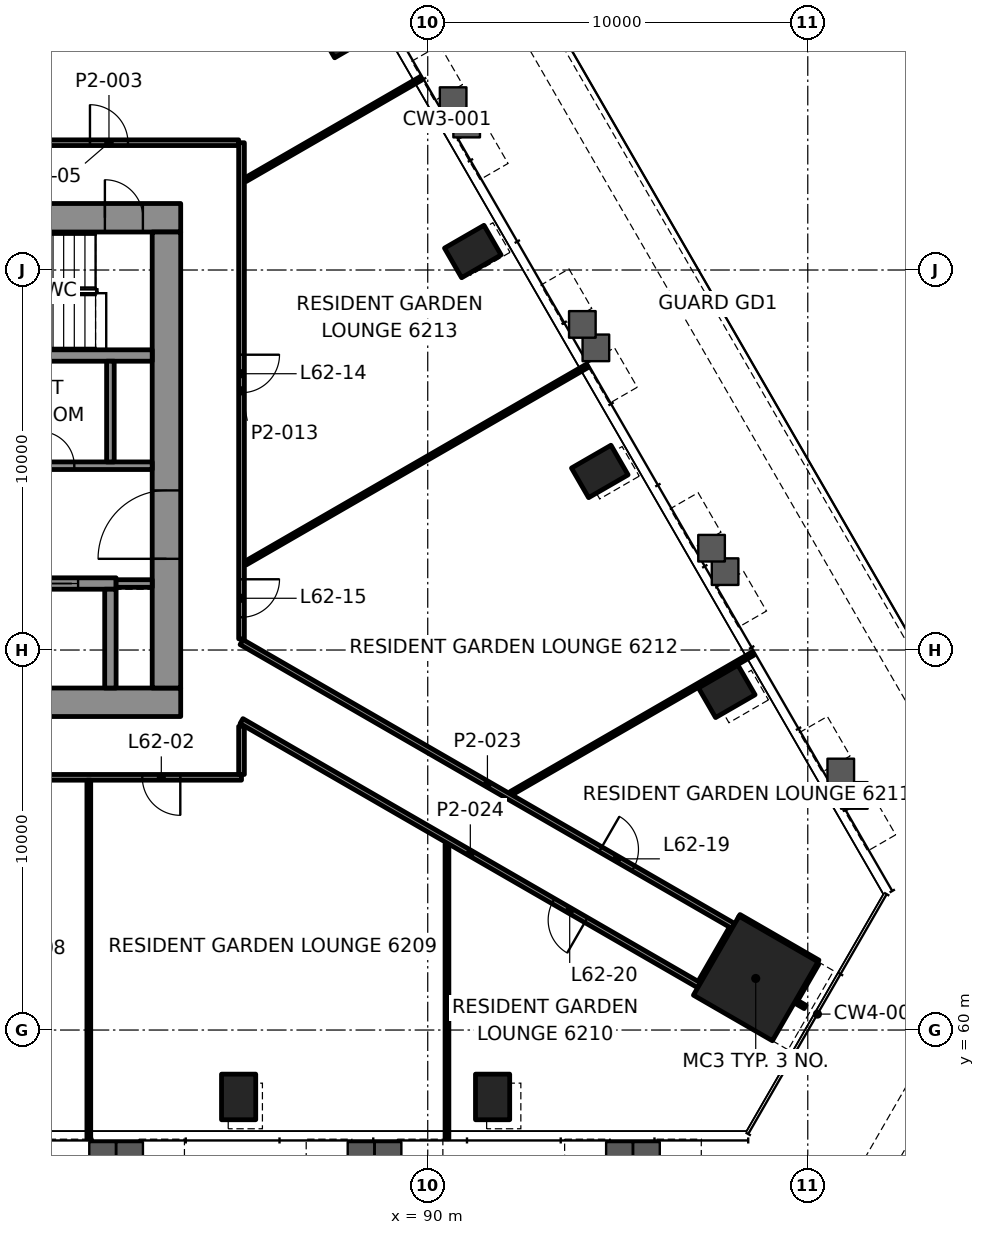
"""IFC4 building model, lengths in metres.
Left out: names, types, materials, properties, quantities, classifications, styles, units other than length and angle.
Written with IfcOpenShell. Run it as: python <this file> out.ifc"""

import sys

from ifc_helpers import new_model, si_unit, direction, frame, frame_2d, origin, origin_2d, place, context, subcontext, project, spatial, rectangle, hollow_rectangle, extrude, element, fill, save


model = new_model("IFC4")
c1 = context("Model", 3, precision=1e-05, world=origin(), true_north=direction((0.0, 1.0)))
c2 = subcontext(c1, "Body", "Model", "MODEL_VIEW")
j1 = project(units=[si_unit("LENGTHUNIT", "METRE"), si_unit("PLANEANGLEUNIT", "RADIAN")], contexts=[c1])
p1 = place(None, origin())
s1 = spatial("IfcSite", under=j1, at=p1, CompositionType="ELEMENT")
p2 = place(p1, origin())
s2 = spatial("IfcBuilding", under=s1, at=p2, CompositionType="ELEMENT")
p3 = place(p2, frame((0.0, 0.0, 263.6)))
s3 = spatial("IfcBuildingStorey", under=s2, at=p3, CompositionType="ELEMENT", Elevation=263.6)
p4 = place(p3, frame((98.63, 61.357, 0.0), z_axis=(0.0, 0.0, 1.0), x_axis=(0.5, 0.866025403784, 0.0)))
e1 = element("IfcColumn", 1, at=p4, inside=s3, PredefinedType="COLUMN", context=c2, shape_type="SweptSolid", body=[
    extrude(rectangle(XDim=2.4, YDim=2.4, at=origin_2d()), origin(), (0.0, 0.0, 1.0), 3.5),
])
for number, where, z_axis, x_axis in (
    (2, (85.024, 58.239, -0.0), (0.0, 0.0, 1.0), (1.0, 0.0, 0.0)),
    (3, (91.707, 58.239, -0.0), (0.0, 0.0, 1.0), (1.0, 0.0, 0.0)),
    (4, (97.869, 68.912, -0.0), (0.0, 0.0, 1.0), (-0.5, 0.866, 0.0)),
    (5, (94.527, 74.699, -0.0), (0.0, 0.0, 1.0), (-0.5, 0.866, 0.0)),
    (6, (91.186, 80.487, -0.0), (0.0, 0.0, 1.0), (-0.5, 0.866, 0.0)),
    (7, (87.844, 86.274, -0.0), (0.0, 0.0, 1.0), (-0.5, 0.866, 0.0)),
):
    element("IfcColumn", number, at=place(p3, frame(where, z_axis=z_axis, x_axis=x_axis)), inside=s3, PredefinedType="COLUMN", context=c2, shape_type="SweptSolid", body=[
        extrude(hollow_rectangle(XDim=0.9, YDim=1.2, WallThickness=0.06, at=origin_2d()), origin(), (0.0, 0.0, 1.0), 3.5),
    ])
p5 = place(p3, frame((66.5, 68.625, 0.0), z_axis=(0.0, 0.0, 1.0), x_axis=(1.0, 0.0, 0.0)))
e8 = element("IfcWall", 8, at=p5, inside=s3, PredefinedType="SHEAR", context=c2, shape_type="SweptSolid", body=[
    extrude(rectangle(XDim=17.0, YDim=0.75, at=frame_2d((8.5, 0.0))), origin(), (0.0, 0.0, 1.0), 3.3),
])
p6 = place(p5, frame((2.7, 0.0, 0.0)))
e9 = element("IfcOpeningElement", 9, at=p6, cuts=e8, PredefinedType="OPENING", context=c2, shape_type="SweptSolid", body=[
    extrude(rectangle(XDim=0.9, YDim=2.1, at=frame_2d((0.45, 1.05))), frame((0.0, 0.385, 0.0), z_axis=(0.0, -1.0, 0.0), x_axis=(1.0, 0.0, 0.0)), (0.0, 0.0, 1.0), 0.77),
])
p7 = place(p3, frame((66.5, 81.375, 0.0), z_axis=(0.0, 0.0, 1.0), x_axis=(1.0, 0.0, 0.0)))
e10 = element("IfcWall", 10, at=p7, inside=s3, PredefinedType="SHEAR", context=c2, shape_type="SweptSolid", body=[
    extrude(rectangle(XDim=17.0, YDim=0.75, at=frame_2d((8.5, 0.0))), origin(), (0.0, 0.0, 1.0), 3.3),
])
p8 = place(p7, frame((1.195, 0.0, 0.0)))
e11 = element("IfcOpeningElement", 11, at=p8, cuts=e10, PredefinedType="OPENING", context=c2, shape_type="SweptSolid", body=[
    extrude(rectangle(XDim=1.0, YDim=2.1, at=frame_2d((0.5, 1.05))), frame((0.0, 0.385, 0.0), z_axis=(0.0, -1.0, 0.0), x_axis=(1.0, 0.0, 0.0)), (0.0, 0.0, 1.0), 0.77),
])
p9 = place(p7, frame((15.005, 0.0, 0.0)))
e12 = element("IfcOpeningElement", 12, at=p9, cuts=e10, PredefinedType="OPENING", context=c2, shape_type="SweptSolid", body=[
    extrude(rectangle(XDim=1.0, YDim=2.1, at=frame_2d((0.5, 1.05))), frame((0.0, 0.385, 0.0), z_axis=(0.0, -1.0, 0.0), x_axis=(1.0, 0.0, 0.0)), (0.0, 0.0, 1.0), 0.77),
])
p10 = place(p7, frame((8.15, 0.0, 0.0)))
e13 = element("IfcOpeningElement", 13, at=p10, cuts=e10, PredefinedType="OPENING", context=c2, shape_type="SweptSolid", body=[
    extrude(rectangle(XDim=0.9, YDim=2.1, at=frame_2d((0.45, 1.05))), frame((0.0, 0.385, 0.0), z_axis=(0.0, -1.0, 0.0), x_axis=(1.0, 0.0, 0.0)), (0.0, 0.0, 1.0), 0.77),
])
p11 = place(p3, frame((83.125, 69.0, 0.0), z_axis=(0.0, 0.0, 1.0), x_axis=(0.0, 1.0, 0.0)))
e14 = element("IfcWall", 14, at=p11, inside=s3, PredefinedType="SHEAR", context=c2, shape_type="SweptSolid", body=[
    extrude(rectangle(XDim=12.0, YDim=0.75, at=frame_2d((6.0, 0.0))), origin(), (0.0, 0.0, 1.0), 3.3),
])
p12 = place(p11, frame((3.4, 0.0, 0.0)))
e15 = element("IfcOpeningElement", 15, at=p12, cuts=e14, PredefinedType="OPENING", context=c2, shape_type="SweptSolid", body=[
    extrude(rectangle(XDim=1.8, YDim=2.1, at=frame_2d((0.9, 1.05))), frame((0.0, 0.385, 0.0), z_axis=(0.0, -1.0, 0.0), x_axis=(1.0, 0.0, 0.0)), (0.0, 0.0, 1.0), 0.77),
])
p13 = place(p3, frame((70.3, 71.75, 0.0), z_axis=(0.0, 0.0, 1.0), x_axis=(1.0, 0.0, 0.0)))
e16 = element("IfcWall", 16, at=p13, inside=s3, PredefinedType="SHEAR", context=c2, shape_type="SweptSolid", body=[
    extrude(rectangle(XDim=11.5, YDim=0.3, at=frame_2d((5.75, 0.0))), origin(), (0.0, 0.0, 1.0), 3.3),
])
p14 = place(p13, frame((1.0, 0.0, 0.0)))
e17 = element("IfcOpeningElement", 17, at=p14, cuts=e16, PredefinedType="OPENING", context=c2, shape_type="SweptSolid", body=[
    extrude(rectangle(XDim=1.1, YDim=2.1, at=frame_2d((0.55, 1.05))), frame((0.0, 0.16, 0.0), z_axis=(0.0, -1.0, 0.0), x_axis=(1.0, 0.0, 0.0)), (0.0, 0.0, 1.0), 0.32),
])
p15 = place(p13, frame((3.8, 0.0, 0.0)))
e18 = element("IfcOpeningElement", 18, at=p15, cuts=e16, PredefinedType="OPENING", context=c2, shape_type="SweptSolid", body=[
    extrude(rectangle(XDim=1.1, YDim=2.1, at=frame_2d((0.55, 1.05))), frame((0.0, 0.16, 0.0), z_axis=(0.0, -1.0, 0.0), x_axis=(1.0, 0.0, 0.0)), (0.0, 0.0, 1.0), 0.32),
])
p16 = place(p13, frame((6.6, 0.0, 0.0)))
e19 = element("IfcOpeningElement", 19, at=p16, cuts=e16, PredefinedType="OPENING", context=c2, shape_type="SweptSolid", body=[
    extrude(rectangle(XDim=1.1, YDim=2.1, at=frame_2d((0.55, 1.05))), frame((0.0, 0.16, 0.0), z_axis=(0.0, -1.0, 0.0), x_axis=(1.0, 0.0, 0.0)), (0.0, 0.0, 1.0), 0.32),
])
p17 = place(p13, frame((9.4, 0.0, 0.0)))
e20 = element("IfcOpeningElement", 20, at=p17, cuts=e16, PredefinedType="OPENING", context=c2, shape_type="SweptSolid", body=[
    extrude(rectangle(XDim=1.1, YDim=2.1, at=frame_2d((0.55, 1.05))), frame((0.0, 0.16, 0.0), z_axis=(0.0, -1.0, 0.0), x_axis=(1.0, 0.0, 0.0)), (0.0, 0.0, 1.0), 0.32),
])
p18 = place(p3, frame((81.65, 69.0, 0.0), z_axis=(0.0, 0.0, 1.0), x_axis=(0.0, 1.0, 0.0)))
e21 = element("IfcWall", 21, at=p18, inside=s3, PredefinedType="SHEAR", context=c2, shape_type="SweptSolid", body=[
    extrude(rectangle(XDim=2.6, YDim=0.3, at=frame_2d((1.3, 0.0))), origin(), (0.0, 0.0, 1.0), 3.3),
])
p19 = place(p3, frame((67.25, 77.75, 0.0), z_axis=(0.0, 0.0, 1.0), x_axis=(1.0, 0.0, 0.0)))
e22 = element("IfcWall", 22, at=p19, inside=s3, PredefinedType="SHEAR", context=c2, shape_type="SweptSolid", body=[
    extrude(rectangle(XDim=15.5, YDim=0.3, at=frame_2d((7.75, 0.0))), origin(), (0.0, 0.0, 1.0), 3.3),
])
p20 = place(p19, frame((0.445, 0.0, 0.0)))
e23 = element("IfcOpeningElement", 23, at=p20, cuts=e22, PredefinedType="OPENING", context=c2, shape_type="SweptSolid", body=[
    extrude(rectangle(XDim=1.0, YDim=2.1, at=frame_2d((0.5, 1.05))), frame((0.0, 0.16, 0.0), z_axis=(0.0, -1.0, 0.0), x_axis=(1.0, 0.0, 0.0)), (0.0, 0.0, 1.0), 0.32),
])
p21 = place(p3, frame((85.1, 66.65, 0.0), z_axis=(0.0, 0.0, 1.0), x_axis=(-1.0, 0.0, 0.0)))
e24 = element("IfcWall", 24, at=p21, inside=s3, PredefinedType="PARTITIONING", context=c2, shape_type="SweptSolid", body=[
    extrude(rectangle(XDim=20.2, YDim=0.15, at=frame_2d((10.1, 0.0))), origin(), (0.0, 0.0, 1.0), 2.7),
])
p22 = place(p21, frame((1.61, 0.0, 0.0)))
e25 = element("IfcOpeningElement", 25, at=p22, cuts=e24, PredefinedType="OPENING", context=c2, shape_type="SweptSolid", body=[
    extrude(rectangle(XDim=1.0, YDim=2.1, at=frame_2d((0.5, 1.05))), frame((0.0, 0.085, 0.0), z_axis=(0.0, -1.0, 0.0), x_axis=(1.0, 0.0, 0.0)), (0.0, 0.0, 1.0), 0.17),
])
p23 = place(p21, frame((8.229, 0.0, 0.0)))
e26 = element("IfcOpeningElement", 26, at=p23, cuts=e24, PredefinedType="OPENING", context=c2, shape_type="SweptSolid", body=[
    extrude(rectangle(XDim=1.0, YDim=2.1, at=frame_2d((0.5, 1.05))), frame((0.0, 0.085, 0.0), z_axis=(0.0, -1.0, 0.0), x_axis=(1.0, 0.0, 0.0)), (0.0, 0.0, 1.0), 0.17),
])
p24 = place(p3, frame((78.2, 83.35, 0.0), z_axis=(0.0, 0.0, 1.0), x_axis=(1.0, 0.0, 0.0)))
e27 = element("IfcWall", 27, at=p24, inside=s3, PredefinedType="PARTITIONING", context=c2, shape_type="SweptSolid", body=[
    extrude(rectangle(XDim=6.824, YDim=0.15, at=frame_2d((3.412, 0.0))), origin(), (0.0, 0.0, 1.0), 2.7),
])
p25 = place(p24, frame((2.912, 0.0, 0.0)))
e28 = element("IfcOpeningElement", 28, at=p25, cuts=e27, PredefinedType="OPENING", context=c2, shape_type="SweptSolid", body=[
    extrude(rectangle(XDim=1.0, YDim=2.1, at=frame_2d((0.5, 1.05))), frame((0.0, 0.085, 0.0), z_axis=(0.0, -1.0, 0.0), x_axis=(1.0, 0.0, 0.0)), (0.0, 0.0, 1.0), 0.17),
])
p26 = place(p3, frame((92.192, 66.23, 0.0), z_axis=(0.0, 0.0, 1.0), x_axis=(0.866026984066, 0.499997262862, 0.0)))
e29 = element("IfcWall", 29, at=p26, inside=s3, PredefinedType="PARTITIONING", context=c2, shape_type="SweptSolid", body=[
    extrude(rectangle(XDim=7.357, YDim=0.1, at=frame_2d((3.678, 0.0))), origin(), (0.0, 0.0, 1.0), 2.688),
])
p27 = place(p3, frame((85.201, 72.284, 0.0), z_axis=(0.0, 0.0, 1.0), x_axis=(0.866018018137, 0.500012792098, 0.0)))
e30 = element("IfcWall", 30, at=p27, inside=s3, PredefinedType="PARTITIONING", context=c2, shape_type="SweptSolid", body=[
    extrude(rectangle(XDim=10.385, YDim=0.1, at=frame_2d((5.192, 0.0))), origin(), (0.0, 0.0, 1.0), 2.688),
])
p28 = place(p3, frame((85.201, 82.375, 0.0), z_axis=(0.0, 0.0, 1.0), x_axis=(0.866025682925, 0.499999516514, 0.0)))
e31 = element("IfcWall", 31, at=p28, inside=s3, PredefinedType="PARTITIONING", context=c2, shape_type="SweptSolid", body=[
    extrude(rectangle(XDim=5.339, YDim=0.1, at=frame_2d((2.67, 0.0))), origin(), (0.0, 0.0, 1.0), 2.688),
])
p29 = place(p3, frame((99.67, 60.757, 0.0), z_axis=(0.0, 0.0, 1.0), x_axis=(0.500022773673, 0.866012254999, 0.0)))
e32 = element("IfcWall", 32, at=p29, inside=s3, PredefinedType="PARTITIONING", context=c2, shape_type="SweptSolid", body=[
    extrude(rectangle(XDim=1.149, YDim=0.1, at=frame_2d((0.575, 0.0))), origin(), (0.0, 0.0, 1.0), 2.7),
])
p30 = place(p3, frame((97.179, 61.243, 0.0), z_axis=(0.0, 0.0, 1.0), x_axis=(0.499988108725, 0.866032269107, 0.0)))
e33 = element("IfcWall", 33, at=p30, inside=s3, PredefinedType="PARTITIONING", context=c2, shape_type="SweptSolid", body=[
    extrude(rectangle(XDim=1.644, YDim=0.15, at=frame_2d((0.822, 0.0))), origin(), (0.0, 0.0, 1.0), 2.547),
])
p31 = place(p3, frame((90.506, 57.139, 0.0), z_axis=(0.0, 0.0, 1.0), x_axis=(0.0, 1.0, 0.0)))
e34 = element("IfcWall", 34, at=p31, inside=s3, PredefinedType="PARTITIONING", context=c2, shape_type="SweptSolid", body=[
    extrude(rectangle(XDim=7.753, YDim=0.1, at=frame_2d((3.876, 0.0))), origin(), (0.0, 0.0, 1.0), 2.7),
])
p32 = place(p3, frame((85.1, 66.726, 0.0), z_axis=(0.0, 0.0, 1.0), x_axis=(0.0, 1.0, 0.0)))
e35 = element("IfcWall", 35, at=p32, inside=s3, PredefinedType="PARTITIONING", context=c2, shape_type="SweptSolid", body=[
    extrude(rectangle(XDim=1.267, YDim=0.15, at=frame_2d((0.634, 0.0))), origin(), (0.0, 0.0, 1.0), 2.547),
])
p33 = place(p3, frame((85.1, 83.35, 0.0), z_axis=(0.0, 0.0, 1.0), x_axis=(0.0, -1.0, 0.0)))
e36 = element("IfcWall", 36, at=p33, inside=s3, PredefinedType="PARTITIONING", context=c2, shape_type="SweptSolid", body=[
    extrude(rectangle(XDim=13.055, YDim=0.15, at=frame_2d((6.527, 0.0))), origin(), (0.0, 0.0, 1.0), 2.7),
])
p34 = place(p33, frame((5.579, 0.0, 0.0)))
e37 = element("IfcOpeningElement", 37, at=p34, cuts=e36, PredefinedType="OPENING", context=c2, shape_type="SweptSolid", body=[
    extrude(rectangle(XDim=1.0, YDim=2.1, at=frame_2d((0.5, 1.05))), frame((0.0, 0.085, 0.0), z_axis=(0.0, -1.0, 0.0), x_axis=(1.0, 0.0, 0.0)), (0.0, 0.0, 1.0), 0.17),
])
p35 = place(p33, frame((11.488, 0.0, 0.0)))
e38 = element("IfcOpeningElement", 38, at=p35, cuts=e36, PredefinedType="OPENING", context=c2, shape_type="SweptSolid", body=[
    extrude(rectangle(XDim=1.0, YDim=2.1, at=frame_2d((0.5, 1.05))), frame((0.0, 0.085, 0.0), z_axis=(0.0, -1.0, 0.0), x_axis=(1.0, 0.0, 0.0)), (0.0, 0.0, 1.0), 0.17),
])
p36 = place(p3, frame((81.082, 57.139, 0.0), z_axis=(0.0, 0.0, 1.0), x_axis=(0.0, 1.0, 0.0)))
e39 = element("IfcWall", 39, at=p36, inside=s3, PredefinedType="PARTITIONING", context=c2, shape_type="SweptSolid", body=[
    extrude(rectangle(XDim=9.436, YDim=0.1, at=frame_2d((4.718, 0.0))), origin(), (0.0, 0.0, 1.0), 2.688),
])
p37 = place(p3, frame((100.269, 61.796, 0.0), z_axis=(0.0, 0.0, 1.0), x_axis=(-0.865992388649, 0.500057179532, 0.0)))
e40 = element("IfcWall", 40, at=p37, inside=s3, PredefinedType="PARTITIONING", context=c2, shape_type="SweptSolid", body=[
    extrude(rectangle(XDim=2.399, YDim=0.1, at=frame_2d((1.2, 0.0))), origin(), (0.0, 0.0, 1.0), 2.7),
])
p38 = place(p3, frame((85.1, 70.208, 0.0), z_axis=(0.0, 0.0, 1.0), x_axis=(0.866022614424, -0.500004831283, 0.0)))
e41 = element("IfcWall", 41, at=p38, inside=s3, PredefinedType="PARTITIONING", context=c2, shape_type="SweptSolid", body=[
    extrude(rectangle(XDim=14.943, YDim=0.15, at=frame_2d((7.472, 0.0))), origin(), (0.0, 0.0, 1.0), 2.7),
])
p39 = place(p38, frame((10.906, 0.0, 0.0)))
e42 = element("IfcOpeningElement", 42, at=p39, cuts=e41, PredefinedType="OPENING", context=c2, shape_type="SweptSolid", body=[
    extrude(rectangle(XDim=1.0, YDim=2.1, at=frame_2d((0.5, 1.05))), frame((0.0, 0.085, 0.0), z_axis=(0.0, -1.0, 0.0), x_axis=(1.0, 0.0, 0.0)), (0.0, 0.0, 1.0), 0.17),
])
p40 = place(p3, frame((99.929, 60.607, 0.0), z_axis=(0.0, 0.0, 1.0), x_axis=(-0.865827443207, 0.500342721131, 0.0)))
e43 = element("IfcWall", 43, at=p40, inside=s3, PredefinedType="PARTITIONING", context=c2, shape_type="SweptSolid", body=[
    extrude(rectangle(XDim=0.25, YDim=0.1, at=frame_2d((0.125, 0.0))), origin(), (0.0, 0.0, 1.0), 2.7),
])
p41 = place(p3, frame((97.141, 61.178, 0.0), z_axis=(0.0, 0.0, 1.0), x_axis=(-0.866020369651, 0.500008719273, 0.0)))
e44 = element("IfcWall", 44, at=p41, inside=s3, PredefinedType="PARTITIONING", context=c2, shape_type="SweptSolid", body=[
    extrude(rectangle(XDim=13.904, YDim=0.15, at=frame_2d((6.952, 0.0))), origin(), (0.0, 0.0, 1.0), 2.547),
])
p42 = place(p41, frame((3.432, 0.0, 0.0)))
e45 = element("IfcOpeningElement", 45, at=p42, cuts=e44, PredefinedType="OPENING", context=c2, shape_type="SweptSolid", body=[
    extrude(rectangle(XDim=1.0, YDim=2.1, at=frame_2d((0.5, 1.05))), frame((0.0, 0.085, 0.0), z_axis=(0.0, -1.0, 0.0), x_axis=(1.0, 0.0, 0.0)), (0.0, 0.0, 1.0), 0.17),
])
p43 = place(p3, frame((100.672, 54.394, 0.0), z_axis=(0.0, 0.0, 1.0), x_axis=(0.499999477917, 0.866025705209, 0.0)))
e46 = element("IfcWall", 46, at=p43, inside=s3, PredefinedType="SOLIDWALL", context=c2, shape_type="SweptSolid", body=[
    extrude(rectangle(XDim=10.019, YDim=0.8, at=frame_2d((5.01, 0.0))), origin(), (0.0, 0.0, 1.0), 0.9),
])
p44 = place(p3, frame((105.682, 64.079, 0.0), z_axis=(0.0, 0.0, 1.0), x_axis=(-0.499999726341, 0.866025561782, 0.0)))
e47 = element("IfcWall", 47, at=p44, inside=s3, PredefinedType="SOLIDWALL", context=c2, shape_type="SweptSolid", body=[
    extrude(rectangle(XDim=34.095, YDim=0.8, at=frame_2d((17.048, 0.0))), origin(), (0.0, 0.0, 1.0), 0.9),
])
p45 = place(p3, frame((81.8, 71.75, 0.0), z_axis=(0.0, 0.0, 1.0), x_axis=(1.0, 0.0, 0.0)))
e48 = element("IfcWall", 48, at=p45, inside=s3, PredefinedType="PARTITIONING", context=c2, shape_type="SweptSolid", body=[
    extrude(rectangle(XDim=0.95, YDim=0.2, at=frame_2d((0.475, 0.0))), origin(), (0.0, 0.0, 1.0), 3.3),
])
p46 = place(p3, frame((76.2, 74.85, 0.0), z_axis=(0.0, 0.0, 1.0), x_axis=(1.0, 0.0, 0.0)))
e49 = element("IfcWall", 49, at=p46, inside=s3, PredefinedType="PARTITIONING", context=c2, shape_type="SweptSolid", body=[
    extrude(rectangle(XDim=6.55, YDim=0.2, at=frame_2d((3.275, 0.0))), origin(), (0.0, 0.0, 1.0), 3.3),
])
p47 = place(p46, frame((0.8, 0.0, 0.0)))
e50 = element("IfcOpeningElement", 50, at=p47, cuts=e49, PredefinedType="OPENING", context=c2, shape_type="SweptSolid", body=[
    extrude(rectangle(XDim=0.9, YDim=2.1, at=frame_2d((0.45, 1.05))), frame((0.0, 0.11, 0.0), z_axis=(0.0, -1.0, 0.0), x_axis=(1.0, 0.0, 0.0)), (0.0, 0.0, 1.0), 0.22),
])
p48 = place(p46, frame((3.6, 0.0, 0.0)))
e51 = element("IfcOpeningElement", 51, at=p48, cuts=e49, PredefinedType="OPENING", context=c2, shape_type="SweptSolid", body=[
    extrude(rectangle(XDim=0.9, YDim=2.1, at=frame_2d((0.45, 1.05))), frame((0.0, 0.11, 0.0), z_axis=(0.0, -1.0, 0.0), x_axis=(1.0, 0.0, 0.0)), (0.0, 0.0, 1.0), 0.22),
])
p49 = place(p3, frame((81.65, 74.95, 0.0), z_axis=(0.0, 0.0, 1.0), x_axis=(0.0, 1.0, 0.0)))
e52 = element("IfcWall", 52, at=p49, inside=s3, PredefinedType="PARTITIONING", context=c2, shape_type="SweptSolid", body=[
    extrude(rectangle(XDim=2.65, YDim=0.2, at=frame_2d((1.325, 0.0))), origin(), (0.0, 0.0, 1.0), 3.3),
])
p50 = place(p22, origin())
e53 = element("IfcDoor", 53, at=p50, inside=s3, OperationType="SINGLE_SWING_LEFT", PredefinedType="DOOR", context=c2, shape_type="SweptSolid", body=[
    extrude(rectangle(XDim=1.0, YDim=2.1, at=frame_2d((0.5, 1.05))), frame((0.0, 0.025, 0.0), z_axis=(0.0, -1.0, 0.0), x_axis=(1.0, 0.0, 0.0)), (0.0, 0.0, 1.0), 0.05),
])
fill(e25, e53)
p51 = place(p25, origin())
e54 = element("IfcDoor", 54, at=p51, inside=s3, OperationType="SINGLE_SWING_LEFT", PredefinedType="DOOR", context=c2, shape_type="SweptSolid", body=[
    extrude(rectangle(XDim=1.0, YDim=2.1, at=frame_2d((0.5, 1.05))), frame((0.0, 0.025, 0.0), z_axis=(0.0, -1.0, 0.0), x_axis=(1.0, 0.0, 0.0)), (0.0, 0.0, 1.0), 0.05),
])
fill(e28, e54)
p52 = place(p34, origin())
e55 = element("IfcDoor", 55, at=p52, inside=s3, OperationType="SINGLE_SWING_LEFT", PredefinedType="DOOR", context=c2, shape_type="SweptSolid", body=[
    extrude(rectangle(XDim=1.0, YDim=2.1, at=frame_2d((0.5, 1.05))), frame((0.0, 0.025, 0.0), z_axis=(0.0, -1.0, 0.0), x_axis=(1.0, 0.0, 0.0)), (0.0, 0.0, 1.0), 0.05),
])
fill(e37, e55)
p53 = place(p35, origin())
e56 = element("IfcDoor", 56, at=p53, inside=s3, OperationType="SINGLE_SWING_RIGHT", PredefinedType="DOOR", context=c2, shape_type="SweptSolid", body=[
    extrude(rectangle(XDim=1.0, YDim=2.1, at=frame_2d((0.5, 1.05))), frame((0.0, 0.025, 0.0), z_axis=(0.0, -1.0, 0.0), x_axis=(1.0, 0.0, 0.0)), (0.0, 0.0, 1.0), 0.05),
])
fill(e38, e56)
p54 = place(p39, origin())
e57 = element("IfcDoor", 57, at=p54, inside=s3, OperationType="SINGLE_SWING_LEFT", PredefinedType="DOOR", context=c2, shape_type="SweptSolid", body=[
    extrude(rectangle(XDim=1.0, YDim=2.1, at=frame_2d((0.5, 1.05))), frame((0.0, 0.025, 0.0), z_axis=(0.0, -1.0, 0.0), x_axis=(1.0, 0.0, 0.0)), (0.0, 0.0, 1.0), 0.05),
])
fill(e42, e57)
p55 = place(p42, origin())
e58 = element("IfcDoor", 58, at=p55, inside=s3, OperationType="SINGLE_SWING_LEFT", PredefinedType="DOOR", context=c2, shape_type="SweptSolid", body=[
    extrude(rectangle(XDim=1.0, YDim=2.1, at=frame_2d((0.5, 1.05))), frame((0.0, 0.025, 0.0), z_axis=(0.0, -1.0, 0.0), x_axis=(1.0, 0.0, 0.0)), (0.0, 0.0, 1.0), 0.05),
])
fill(e45, e58)
p56 = place(p17, origin())
e59 = element("IfcDoor", 59, at=p56, inside=s3, OperationType="DOUBLE_DOOR_SLIDING", PredefinedType="DOOR", context=c2, shape_type="SweptSolid", body=[
    extrude(rectangle(XDim=1.1, YDim=2.1, at=frame_2d((0.55, 1.05))), frame((0.0, 0.025, 0.0), z_axis=(0.0, -1.0, 0.0), x_axis=(1.0, 0.0, 0.0)), (0.0, 0.0, 1.0), 0.05),
])
fill(e20, e59)
p57 = place(p9, origin())
e60 = element("IfcDoor", 60, at=p57, inside=s3, OperationType="SINGLE_SWING_LEFT", PredefinedType="DOOR", context=c2, shape_type="SweptSolid", body=[
    extrude(rectangle(XDim=1.0, YDim=2.1, at=frame_2d((0.5, 1.05))), frame((0.0, 0.095, 0.0), z_axis=(0.0, -1.0, 0.0), x_axis=(1.0, 0.0, 0.0)), (0.0, 0.0, 1.0), 0.19),
])
fill(e12, e60)
p58 = place(p12, origin())
e61 = element("IfcDoor", 61, at=p58, inside=s3, OperationType="SINGLE_SWING_LEFT", PredefinedType="DOOR", context=c2, shape_type="SweptSolid", body=[
    extrude(rectangle(XDim=1.8, YDim=2.1, at=frame_2d((0.9, 1.05))), frame((0.0, 0.095, 0.0), z_axis=(0.0, -1.0, 0.0), x_axis=(1.0, 0.0, 0.0)), (0.0, 0.0, 1.0), 0.19),
])
fill(e15, e61)
p59 = place(p48, origin())
e62 = element("IfcDoor", 62, at=p59, inside=s3, OperationType="SINGLE_SWING_LEFT", PredefinedType="DOOR", context=c2, shape_type="SweptSolid", body=[
    extrude(rectangle(XDim=0.9, YDim=2.1, at=frame_2d((0.45, 1.05))), frame((0.0, 0.025, 0.0), z_axis=(0.0, -1.0, 0.0), x_axis=(1.0, 0.0, 0.0)), (0.0, 0.0, 1.0), 0.05),
])
fill(e51, e62)
save(model, sys.argv[1])
